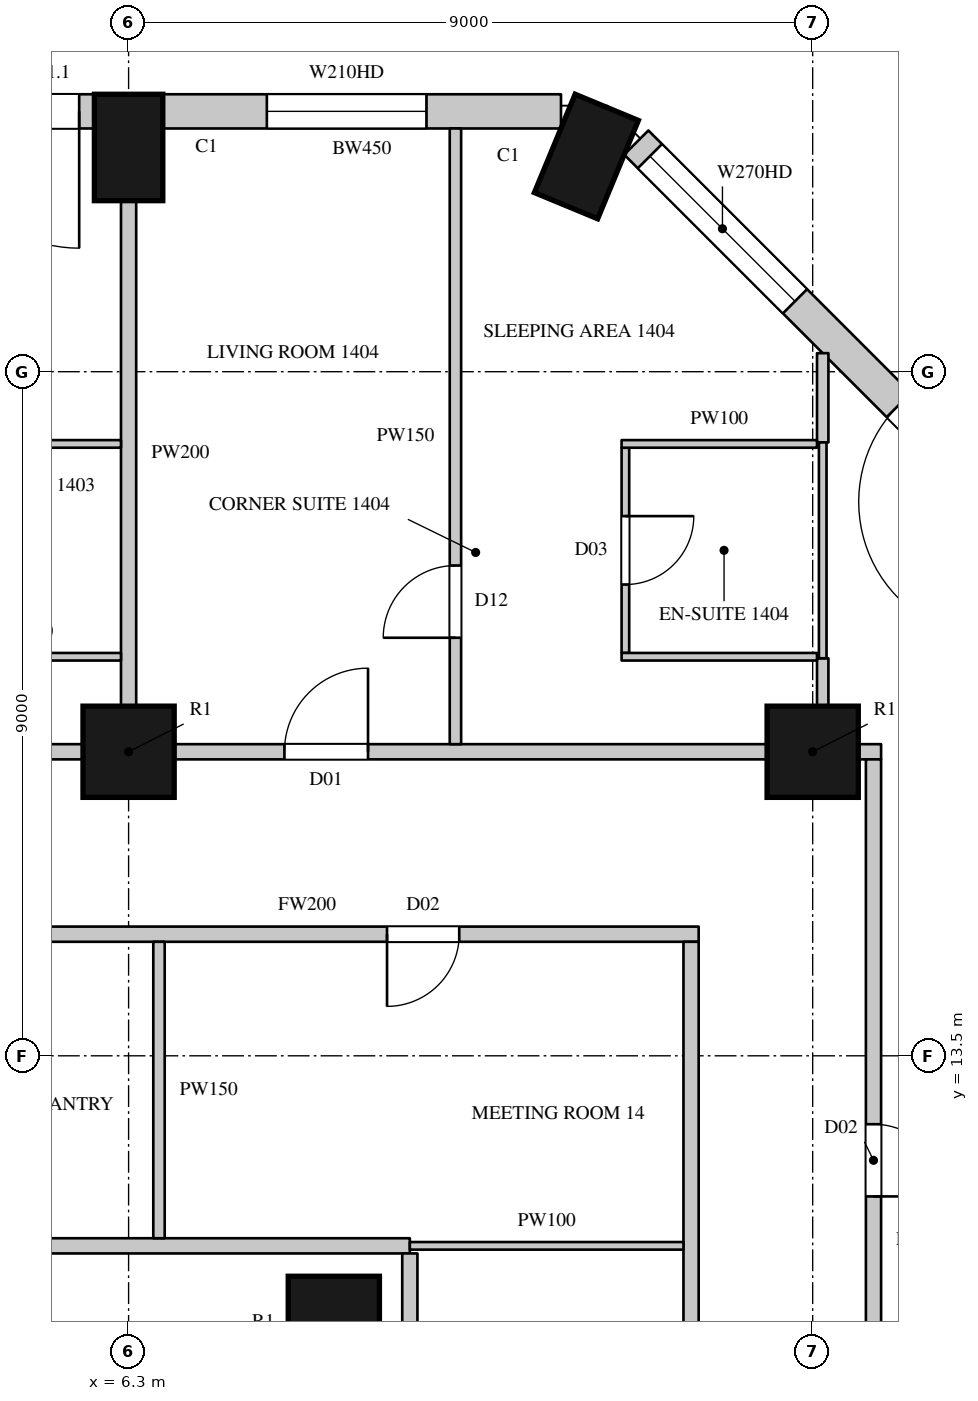
"""IFC4 building model, lengths in metres.
Left out: names, types, materials, properties, quantities, classifications, styles, units other than length and angle.
Written with IfcOpenShell. Run it as: python <this file> out.ifc"""

import sys

from ifc_helpers import new_model, si_unit, direction, frame, frame_2d, origin, origin_2d, place, context, subcontext, project, spatial, rectangle, circle, extrude, element, fill, save


model = new_model("IFC4")
c1 = context("Model", 3, precision=1e-05, world=origin(), true_north=direction((0.0, 1.0)))
c2 = subcontext(c1, "Body", "Model", "MODEL_VIEW")
j1 = project(units=[si_unit("LENGTHUNIT", "METRE"), si_unit("PLANEANGLEUNIT", "RADIAN")], contexts=[c1])
p1 = place(None, origin())
s1 = spatial("IfcSite", under=j1, at=p1, CompositionType="ELEMENT")
p2 = place(p1, origin())
s2 = spatial("IfcBuilding", under=s1, at=p2, CompositionType="ELEMENT")
p3 = place(p2, frame((0.0, 0.0, 80.7)))
s3 = spatial("IfcBuildingStorey", under=s2, at=p3, CompositionType="ELEMENT", Elevation=80.7)
for number, where, z_axis, x_axis in (
    (1, (12.323, 25.331, 0.0), (0.0, 0.0, 1.0), (-0.924, 0.383, 0.0)),
    (2, (6.3, 25.45, 0.0), (0.0, 0.0, 1.0), (-1.0, 0.0, 0.0)),
):
    element("IfcColumn", number, at=place(p3, frame(where, z_axis=z_axis, x_axis=x_axis)), inside=s3, PredefinedType="COLUMN", context=c2, shape_type="SweptSolid", body=[
        extrude(rectangle(XDim=0.9, YDim=1.4, at=origin_2d()), origin(), (0.0, 0.0, 1.0), 3.6),
    ])
for number, where, z_axis, x_axis in (
    (3, (6.3, 17.5, 0.0), (0.0, 0.0, 1.0), (1.0, 0.0, 0.0)),
    (4, (15.3, 17.5, 0.0), (0.0, 0.0, 1.0), (1.0, 0.0, 0.0)),
    (5, (9.0, 10.0, 0.0), (0.0, 0.0, 1.0), (1.0, 0.0, 0.0)),
):
    element("IfcColumn", number, at=place(p3, frame(where, z_axis=z_axis, x_axis=x_axis)), inside=s3, PredefinedType="COLUMN", context=c2, shape_type="SweptSolid", body=[
        extrude(circle(Radius=0.6, at=origin_2d()), origin(), (0.0, 0.0, 1.0), 3.6),
    ])
p4 = place(p3, frame((18.229, 20.265, 0.0), z_axis=(0.0, 0.0, 1.0), x_axis=(-0.707106781187, 0.707106781187, 0.0)))
e6 = element("IfcWall", 6, at=p4, inside=s3, PredefinedType="SOLIDWALL", context=c2, shape_type="SweptSolid", body=[
    extrude(rectangle(XDim=7.424, YDim=0.45, at=frame_2d((3.712, 0.0))), origin(), (0.0, 0.0, 1.0), 3.3),
])
p5 = place(p4, frame((0.74, 0.0, 0.0)))
e7 = element("IfcOpeningElement", 7, at=p5, cuts=e6, PredefinedType="OPENING", context=c2, shape_type="SweptSolid", body=[
    extrude(rectangle(XDim=1.8, YDim=2.4, at=frame_2d((0.9, 1.2))), frame((0.0, 0.235, 0.0), z_axis=(0.0, -1.0, 0.0), x_axis=(1.0, 0.0, 0.0)), (0.0, 0.0, 1.0), 0.47),
])
p6 = place(p4, frame((4.471, 0.0, 1.05)))
e8 = element("IfcOpeningElement", 8, at=p6, cuts=e6, PredefinedType="OPENING", context=c2, shape_type="SweptSolid", body=[
    extrude(rectangle(XDim=2.7, YDim=2.0, at=frame_2d((1.35, 1.0))), frame((0.0, 0.235, 0.0), z_axis=(0.0, -1.0, 0.0), x_axis=(1.0, 0.0, 0.0)), (0.0, 0.0, 1.0), 0.47),
])
p7 = place(p3, frame((11.989, 25.925, 0.0), z_axis=(0.0, 0.0, 1.0), x_axis=(-1.0, 0.0, 0.0)))
e9 = element("IfcWall", 9, at=p7, inside=s3, PredefinedType="SOLIDWALL", context=c2, shape_type="SweptSolid", body=[
    extrude(rectangle(XDim=5.239, YDim=0.45, at=frame_2d((2.619, 0.0))), origin(), (0.0, 0.0, 1.0), 3.3),
])
p8 = place(p7, frame((1.77, 0.0, 1.05)))
e10 = element("IfcOpeningElement", 10, at=p8, cuts=e9, PredefinedType="OPENING", context=c2, shape_type="SweptSolid", body=[
    extrude(rectangle(XDim=2.1, YDim=2.0, at=frame_2d((1.05, 1.0))), frame((0.0, 0.235, 0.0), z_axis=(0.0, -1.0, 0.0), x_axis=(1.0, 0.0, 0.0)), (0.0, 0.0, 1.0), 0.47),
])
p9 = place(p3, frame((5.85, 25.925, 0.0), z_axis=(0.0, 0.0, 1.0), x_axis=(-1.0, 0.0, 0.0)))
e11 = element("IfcWall", 11, at=p9, inside=s3, PredefinedType="SOLIDWALL", context=c2, shape_type="SweptSolid", body=[
    extrude(rectangle(XDim=8.1, YDim=0.45, at=frame_2d((4.05, 0.0))), origin(), (0.0, 0.0, 1.0), 3.3),
])
p10 = place(p9, frame((0.2, 0.0, 0.0)))
e12 = element("IfcOpeningElement", 12, at=p10, cuts=e11, PredefinedType="OPENING", context=c2, shape_type="SweptSolid", body=[
    extrude(rectangle(XDim=1.8, YDim=2.4, at=frame_2d((0.9, 1.2))), frame((0.0, 0.235, 0.0), z_axis=(0.0, -1.0, 0.0), x_axis=(1.0, 0.0, 0.0)), (0.0, 0.0, 1.0), 0.47),
])
p11 = place(p9, frame((2.2, 0.0, 1.05)))
e13 = element("IfcOpeningElement", 13, at=p11, cuts=e11, PredefinedType="OPENING", context=c2, shape_type="SweptSolid", body=[
    extrude(rectangle(XDim=1.2, YDim=2.0, at=frame_2d((0.6, 1.0))), frame((0.0, 0.235, 0.0), z_axis=(0.0, -1.0, 0.0), x_axis=(1.0, 0.0, 0.0)), (0.0, 0.0, 1.0), 0.47),
])
p12 = place(p9, frame((4.7, 0.0, 0.0)))
e14 = element("IfcOpeningElement", 14, at=p12, cuts=e11, PredefinedType="OPENING", context=c2, shape_type="SweptSolid", body=[
    extrude(rectangle(XDim=1.8, YDim=2.4, at=frame_2d((0.9, 1.2))), frame((0.0, 0.235, 0.0), z_axis=(0.0, -1.0, 0.0), x_axis=(1.0, 0.0, 0.0)), (0.0, 0.0, 1.0), 0.47),
])
p13 = place(p9, frame((6.7, 0.0, 1.05)))
e15 = element("IfcOpeningElement", 15, at=p13, cuts=e11, PredefinedType="OPENING", context=c2, shape_type="SweptSolid", body=[
    extrude(rectangle(XDim=1.2, YDim=2.0, at=frame_2d((0.6, 1.0))), frame((0.0, 0.235, 0.0), z_axis=(0.0, -1.0, 0.0), x_axis=(1.0, 0.0, 0.0)), (0.0, 0.0, 1.0), 0.47),
])
p14 = place(p3, frame((16.486, 23.529, 0.0), z_axis=(0.0, 0.0, 1.0), x_axis=(-0.707022305137, 0.707191247145, 0.0)))
e16 = element("IfcWall", 16, at=p14, inside=s3, PredefinedType="SOLIDWALL", context=c2, shape_type="SweptSolid", body=[
    extrude(rectangle(XDim=1.445, YDim=0.45, at=frame_2d((0.723, 0.0))), origin(), (0.0, 0.0, 1.0), 0.6),
])
p15 = place(p3, frame((-2.1, 17.5, 0.0), z_axis=(0.0, 0.0, 1.0), x_axis=(1.0, 0.0, 0.0)))
e17 = element("IfcWall", 17, at=p15, inside=s3, PredefinedType="PARTITIONING", context=c2, shape_type="SweptSolid", body=[
    extrude(rectangle(XDim=7.8, YDim=0.2, at=frame_2d((3.9, 0.0))), origin(), (0.0, 0.0, 1.0), 2.75),
])
p16 = place(p15, frame((1.55, 0.0, 0.0)))
e18 = element("IfcOpeningElement", 18, at=p16, cuts=e17, PredefinedType="OPENING", context=c2, shape_type="SweptSolid", body=[
    extrude(rectangle(XDim=1.1, YDim=2.4, at=frame_2d((0.55, 1.2))), frame((0.0, 0.11, 0.0), z_axis=(0.0, -1.0, 0.0), x_axis=(1.0, 0.0, 0.0)), (0.0, 0.0, 1.0), 0.22),
])
p17 = place(p3, frame((6.9, 17.5, 0.0), z_axis=(0.0, 0.0, 1.0), x_axis=(1.0, 0.0, 0.0)))
e19 = element("IfcWall", 19, at=p17, inside=s3, PredefinedType="PARTITIONING", context=c2, shape_type="SweptSolid", body=[
    extrude(rectangle(XDim=7.8, YDim=0.2, at=frame_2d((3.9, 0.0))), origin(), (0.0, 0.0, 1.0), 2.75),
])
p18 = place(p17, frame((1.45, 0.0, 0.0)))
e20 = element("IfcOpeningElement", 20, at=p18, cuts=e19, PredefinedType="OPENING", context=c2, shape_type="SweptSolid", body=[
    extrude(rectangle(XDim=1.1, YDim=2.4, at=frame_2d((0.55, 1.2))), frame((0.0, 0.11, 0.0), z_axis=(0.0, -1.0, 0.0), x_axis=(1.0, 0.0, 0.0)), (0.0, 0.0, 1.0), 0.22),
])
p19 = place(p3, frame((15.9, 17.5, 0.0), z_axis=(0.0, 0.0, 1.0), x_axis=(1.0, 0.0, 0.0)))
e21 = element("IfcWall", 21, at=p19, inside=s3, PredefinedType="PARTITIONING", context=c2, shape_type="SweptSolid", body=[
    extrude(rectangle(XDim=0.3, YDim=0.2, at=frame_2d((0.15, 0.0))), origin(), (0.0, 0.0, 1.0), 3.3),
])
p20 = place(p3, frame((-7.9, 11.0, 0.0), z_axis=(0.0, 0.0, 1.0), x_axis=(1.0, 0.0, 0.0)))
e22 = element("IfcWall", 22, at=p20, inside=s3, PredefinedType="PARTITIONING", context=c2, shape_type="SweptSolid", body=[
    extrude(rectangle(XDim=17.9, YDim=0.2, at=frame_2d((8.95, 0.0))), origin(), (0.0, 0.0, 1.0), 3.3),
])
p21 = place(p20, frame((9.5, 0.0, 0.0)))
e23 = element("IfcOpeningElement", 23, at=p21, cuts=e22, PredefinedType="OPENING", context=c2, shape_type="SweptSolid", body=[
    extrude(rectangle(XDim=1.5, YDim=2.2, at=frame_2d((0.75, 1.1))), frame((0.0, 0.11, 0.0), z_axis=(0.0, -1.0, 0.0), x_axis=(1.0, 0.0, 0.0)), (0.0, 0.0, 1.0), 0.22),
])
p22 = place(p3, frame((3.5, 15.1, 0.0), z_axis=(0.0, 0.0, 1.0), x_axis=(1.0, 0.0, 0.0)))
e24 = element("IfcWall", 24, at=p22, inside=s3, PredefinedType="PARTITIONING", context=c2, shape_type="SweptSolid", body=[
    extrude(rectangle(XDim=10.3, YDim=0.2, at=frame_2d((5.15, 0.0))), origin(), (0.0, 0.0, 1.0), 3.3),
])
p23 = place(p22, frame((6.2, 0.0, 0.0)))
e25 = element("IfcOpeningElement", 25, at=p23, cuts=e24, PredefinedType="OPENING", context=c2, shape_type="SweptSolid", body=[
    extrude(rectangle(XDim=0.95, YDim=2.2, at=frame_2d((0.475, 1.1))), frame((0.0, 0.11, 0.0), z_axis=(0.0, -1.0, 0.0), x_axis=(1.0, 0.0, 0.0)), (0.0, 0.0, 1.0), 0.22),
])
p24 = place(p3, frame((10.0, -10.9, 0.0), z_axis=(0.0, 0.0, 1.0), x_axis=(0.0, 1.0, 0.0)))
e26 = element("IfcWall", 26, at=p24, inside=s3, PredefinedType="PARTITIONING", context=c2, shape_type="SweptSolid", body=[
    extrude(rectangle(XDim=21.8, YDim=0.2, at=frame_2d((10.9, 0.0))), origin(), (0.0, 0.0, 1.0), 3.3),
])
p25 = place(p24, frame((15.9, 0.0, 0.0)))
e27 = element("IfcOpeningElement", 27, at=p25, cuts=e26, PredefinedType="OPENING", context=c2, shape_type="SweptSolid", body=[
    extrude(rectangle(XDim=1.5, YDim=2.2, at=frame_2d((0.75, 1.1))), frame((0.0, 0.11, 0.0), z_axis=(0.0, -1.0, 0.0), x_axis=(1.0, 0.0, 0.0)), (0.0, 0.0, 1.0), 0.22),
])
p26 = place(p24, frame((8.75, 0.0, 0.0)))
e28 = element("IfcOpeningElement", 28, at=p26, cuts=e26, PredefinedType="OPENING", context=c2, shape_type="SweptSolid", body=[
    extrude(rectangle(XDim=1.5, YDim=2.2, at=frame_2d((0.75, 1.1))), frame((0.0, 0.11, 0.0), z_axis=(0.0, -1.0, 0.0), x_axis=(1.0, 0.0, 0.0)), (0.0, 0.0, 1.0), 0.22),
])
p27 = place(p3, frame((13.7, 6.825, 0.0), z_axis=(0.0, 0.0, 1.0), x_axis=(0.0, 1.0, 0.0)))
e29 = element("IfcWall", 29, at=p27, inside=s3, PredefinedType="PARTITIONING", context=c2, shape_type="SweptSolid", body=[
    extrude(rectangle(XDim=8.175, YDim=0.2, at=frame_2d((4.087, 0.0))), origin(), (0.0, 0.0, 1.0), 3.3),
])
p28 = place(p3, frame((16.1, 4.75, 0.0), z_axis=(0.0, 0.0, 1.0), x_axis=(0.0, 1.0, 0.0)))
e30 = element("IfcWall", 30, at=p28, inside=s3, PredefinedType="PARTITIONING", context=c2, shape_type="SweptSolid", body=[
    extrude(rectangle(XDim=12.65, YDim=0.2, at=frame_2d((6.325, 0.0))), origin(), (0.0, 0.0, 1.0), 3.3),
])
p29 = place(p28, frame((0.5, 0.0, 0.0)))
e31 = element("IfcOpeningElement", 31, at=p29, cuts=e30, PredefinedType="OPENING", context=c2, shape_type="SweptSolid", body=[
    extrude(rectangle(XDim=0.95, YDim=2.2, at=frame_2d((0.475, 1.1))), frame((0.0, 0.11, 0.0), z_axis=(0.0, -1.0, 0.0), x_axis=(1.0, 0.0, 0.0)), (0.0, 0.0, 1.0), 0.22),
])
p30 = place(p28, frame((6.9, 0.0, 0.0)))
e32 = element("IfcOpeningElement", 32, at=p30, cuts=e30, PredefinedType="OPENING", context=c2, shape_type="SweptSolid", body=[
    extrude(rectangle(XDim=0.95, YDim=2.2, at=frame_2d((0.475, 1.1))), frame((0.0, 0.11, 0.0), z_axis=(0.0, -1.0, 0.0), x_axis=(1.0, 0.0, 0.0)), (0.0, 0.0, 1.0), 0.22),
])
p31 = place(p3, frame((6.7, 11.1, 0.0), z_axis=(0.0, 0.0, 1.0), x_axis=(0.0, 1.0, 0.0)))
e33 = element("IfcWall", 33, at=p31, inside=s3, PredefinedType="PARTITIONING", context=c2, shape_type="SweptSolid", body=[
    extrude(rectangle(XDim=3.9, YDim=0.15, at=frame_2d((1.95, 0.0))), origin(), (0.0, 0.0, 1.0), 3.3),
])
p32 = place(p3, frame((10.6, 17.6, 0.0), z_axis=(0.0, 0.0, 1.0), x_axis=(0.0, 1.0, 0.0)))
e34 = element("IfcWall", 34, at=p32, inside=s3, PredefinedType="PARTITIONING", context=c2, shape_type="SweptSolid", body=[
    extrude(rectangle(XDim=8.1, YDim=0.15, at=frame_2d((4.05, 0.0))), origin(), (0.0, 0.0, 1.0), 3.3),
])
p33 = place(p32, frame((1.4, 0.0, 0.0)))
e35 = element("IfcOpeningElement", 35, at=p33, cuts=e34, PredefinedType="OPENING", context=c2, shape_type="SweptSolid", body=[
    extrude(rectangle(XDim=0.95, YDim=2.2, at=frame_2d((0.475, 1.1))), frame((0.0, 0.085, 0.0), z_axis=(0.0, -1.0, 0.0), x_axis=(1.0, 0.0, 0.0)), (0.0, 0.0, 1.0), 0.17),
])
p34 = place(p3, frame((15.432, 18.094, 0.0), z_axis=(0.0, 0.0, 1.0), x_axis=(0.0, 1.0, 0.0)))
e36 = element("IfcWall", 36, at=p34, inside=s3, PredefinedType="PARTITIONING", context=c2, shape_type="SweptSolid", body=[
    extrude(rectangle(XDim=0.636, YDim=0.15, at=frame_2d((0.318, 0.0))), origin(), (0.0, 0.0, 1.0), 3.3),
])
p35 = place(p3, frame((15.432, 21.57, 0.0), z_axis=(0.0, 0.0, 1.0), x_axis=(0.0, 1.0, 0.0)))
e37 = element("IfcWall", 37, at=p35, inside=s3, PredefinedType="PARTITIONING", context=c2, shape_type="SweptSolid", body=[
    extrude(rectangle(XDim=1.174, YDim=0.15, at=frame_2d((0.587, 0.0))), origin(), (0.0, 0.0, 1.0), 3.3),
])
p36 = place(p3, frame((6.3, 18.1, 0.0), z_axis=(0.0, 0.0, 1.0), x_axis=(0.0, 1.0, 0.0)))
e38 = element("IfcWall", 38, at=p36, inside=s3, PredefinedType="PARTITIONING", context=c2, shape_type="SweptSolid", body=[
    extrude(rectangle(XDim=6.65, YDim=0.2, at=frame_2d((3.325, 0.0))), origin(), (0.0, 0.0, 1.0), 2.75),
])
for number, where, z_axis, x_axis in (
    (39, (3.654, 18.75, 0.0), (0.0, 0.0, 1.0), (1.0, 0.0, 0.0)),
    (40, (3.654, 21.55, 0.0), (0.0, 0.0, 1.0), (1.0, 0.0, 0.0)),
):
    element("IfcWall", number, at=place(p3, frame(where, z_axis=z_axis, x_axis=x_axis)), inside=s3, PredefinedType="PARTITIONING", context=c2, shape_type="SweptSolid", body=[
        extrude(rectangle(XDim=2.546, YDim=0.1, at=frame_2d((1.273, 0.0))), origin(), (0.0, 0.0, 1.0), 3.3),
    ])
p37 = place(p3, frame((10.0, 11.0, 0.0), z_axis=(0.0, 0.0, 1.0), x_axis=(1.0, 0.0, 0.0)))
e41 = element("IfcWall", 41, at=p37, inside=s3, PredefinedType="PARTITIONING", context=c2, shape_type="SweptSolid", body=[
    extrude(rectangle(XDim=3.6, YDim=0.1, at=frame_2d((1.8, 0.0))), origin(), (0.0, 0.0, 1.0), 3.3),
])
p38 = place(p3, frame((12.836, 18.8, 0.0), z_axis=(0.0, 0.0, 1.0), x_axis=(0.0, 1.0, 0.0)))
e42 = element("IfcWall", 42, at=p38, inside=s3, PredefinedType="PARTITIONING", context=c2, shape_type="SweptSolid", body=[
    extrude(rectangle(XDim=2.7, YDim=0.1, at=frame_2d((1.35, 0.0))), origin(), (0.0, 0.0, 1.0), 3.3),
])
p39 = place(p38, frame((0.9, 0.0, 0.0)))
e43 = element("IfcOpeningElement", 43, at=p39, cuts=e42, PredefinedType="OPENING", context=c2, shape_type="SweptSolid", body=[
    extrude(rectangle(XDim=0.9, YDim=2.2, at=frame_2d((0.45, 1.1))), frame((0.0, 0.06, 0.0), z_axis=(0.0, -1.0, 0.0), x_axis=(1.0, 0.0, 0.0)), (0.0, 0.0, 1.0), 0.12),
])
for number, where, z_axis, x_axis in (
    (44, (12.786, 18.75, 0.0), (0.0, 0.0, 1.0), (1.0, 0.0, 0.0)),
    (45, (12.786, 21.55, 0.0), (0.0, 0.0, 1.0), (1.0, 0.0, 0.0)),
):
    element("IfcWall", number, at=place(p3, frame(where, z_axis=z_axis, x_axis=x_axis)), inside=s3, PredefinedType="PARTITIONING", context=c2, shape_type="SweptSolid", body=[
        extrude(rectangle(XDim=2.571, YDim=0.1, at=frame_2d((1.286, 0.0))), origin(), (0.0, 0.0, 1.0), 3.3),
    ])
p40 = place(p3, frame((15.432, 18.73, 0.0), z_axis=(0.0, 0.0, 1.0), x_axis=(0.0, 1.0, 0.0)))
e46 = element("IfcWall", 46, at=p40, inside=s3, PredefinedType="PARTITIONING", context=c2, shape_type="SweptSolid", body=[
    extrude(rectangle(XDim=2.84, YDim=0.1, at=frame_2d((1.42, 0.0))), origin(), (0.0, 0.0, 1.0), 3.3),
])
p41 = place(p5, origin())
e47 = element("IfcDoor", 47, at=p41, inside=s3, OperationType="SLIDING_TO_LEFT", PredefinedType="DOOR", context=c2, shape_type="SweptSolid", body=[
    extrude(rectangle(XDim=1.8, YDim=2.4, at=frame_2d((0.9, 1.2))), frame((0.0, 0.13, 0.0), z_axis=(0.0, -1.0, 0.0), x_axis=(1.0, 0.0, 0.0)), (0.0, 0.0, 1.0), 0.05),
])
fill(e7, e47)
p42 = place(p6, origin())
e48 = element("IfcWindow", 48, at=p42, inside=s3, PartitioningType="SINGLE_PANEL", PredefinedType="WINDOW", context=c2, shape_type="SweptSolid", body=[
    extrude(rectangle(XDim=2.7, YDim=2.0, at=frame_2d((1.35, 1.0))), frame((0.0, 0.135, 0.0), z_axis=(0.0, -1.0, 0.0), x_axis=(1.0, 0.0, 0.0)), (0.0, 0.0, 1.0), 0.06),
])
fill(e8, e48)
p43 = place(p10, origin())
e49 = element("IfcDoor", 49, at=p43, inside=s3, OperationType="SLIDING_TO_LEFT", PredefinedType="DOOR", context=c2, shape_type="SweptSolid", body=[
    extrude(rectangle(XDim=1.8, YDim=2.4, at=frame_2d((0.9, 1.2))), frame((0.0, 0.13, 0.0), z_axis=(0.0, -1.0, 0.0), x_axis=(1.0, 0.0, 0.0)), (0.0, 0.0, 1.0), 0.05),
])
fill(e12, e49)
p44 = place(p23, origin())
e50 = element("IfcDoor", 50, at=p44, inside=s3, OperationType="SINGLE_SWING_RIGHT", PredefinedType="DOOR", context=c2, shape_type="SweptSolid", body=[
    extrude(rectangle(XDim=0.95, YDim=2.2, at=frame_2d((0.475, 1.1))), frame((0.0, 0.025, 0.0), z_axis=(0.0, -1.0, 0.0), x_axis=(1.0, 0.0, 0.0)), (0.0, 0.0, 1.0), 0.05),
])
fill(e25, e50)
p45 = place(p18, origin())
e51 = element("IfcDoor", 51, at=p45, inside=s3, OperationType="SINGLE_SWING_RIGHT", PredefinedType="DOOR", context=c2, shape_type="SweptSolid", body=[
    extrude(rectangle(XDim=1.1, YDim=2.4, at=frame_2d((0.55, 1.2))), frame((0.0, 0.025, 0.0), z_axis=(0.0, -1.0, 0.0), x_axis=(1.0, 0.0, 0.0)), (0.0, 0.0, 1.0), 0.05),
])
fill(e20, e51)
p46 = place(p33, origin())
e52 = element("IfcDoor", 52, at=p46, inside=s3, OperationType="SINGLE_SWING_LEFT", PredefinedType="DOOR", context=c2, shape_type="SweptSolid", body=[
    extrude(rectangle(XDim=0.95, YDim=2.2, at=frame_2d((0.475, 1.1))), frame((0.0, 0.025, 0.0), z_axis=(0.0, -1.0, 0.0), x_axis=(1.0, 0.0, 0.0)), (0.0, 0.0, 1.0), 0.05),
])
fill(e35, e52)
p47 = place(p39, origin())
e53 = element("IfcDoor", 53, at=p47, inside=s3, OperationType="SINGLE_SWING_LEFT", PredefinedType="DOOR", context=c2, shape_type="SweptSolid", body=[
    extrude(rectangle(XDim=0.9, YDim=2.2, at=frame_2d((0.45, 1.1))), frame((0.0, 0.025, 0.0), z_axis=(0.0, -1.0, 0.0), x_axis=(1.0, 0.0, 0.0)), (0.0, 0.0, 1.0), 0.05),
])
fill(e43, e53)
p48 = place(p30, origin())
e54 = element("IfcDoor", 54, at=p48, inside=s3, OperationType="SINGLE_SWING_RIGHT", PredefinedType="DOOR", context=c2, shape_type="SweptSolid", body=[
    extrude(rectangle(XDim=0.95, YDim=2.2, at=frame_2d((0.475, 1.1))), frame((0.0, 0.025, 0.0), z_axis=(0.0, -1.0, 0.0), x_axis=(1.0, 0.0, 0.0)), (0.0, 0.0, 1.0), 0.05),
])
fill(e32, e54)
p49 = place(p8, origin())
e55 = element("IfcWindow", 55, at=p49, inside=s3, PartitioningType="SINGLE_PANEL", PredefinedType="WINDOW", context=c2, shape_type="SweptSolid", body=[
    extrude(rectangle(XDim=2.1, YDim=2.0, at=frame_2d((1.05, 1.0))), frame((0.0, 0.135, 0.0), z_axis=(0.0, -1.0, 0.0), x_axis=(1.0, 0.0, 0.0)), (0.0, 0.0, 1.0), 0.06),
])
fill(e10, e55)
save(model, sys.argv[1])
